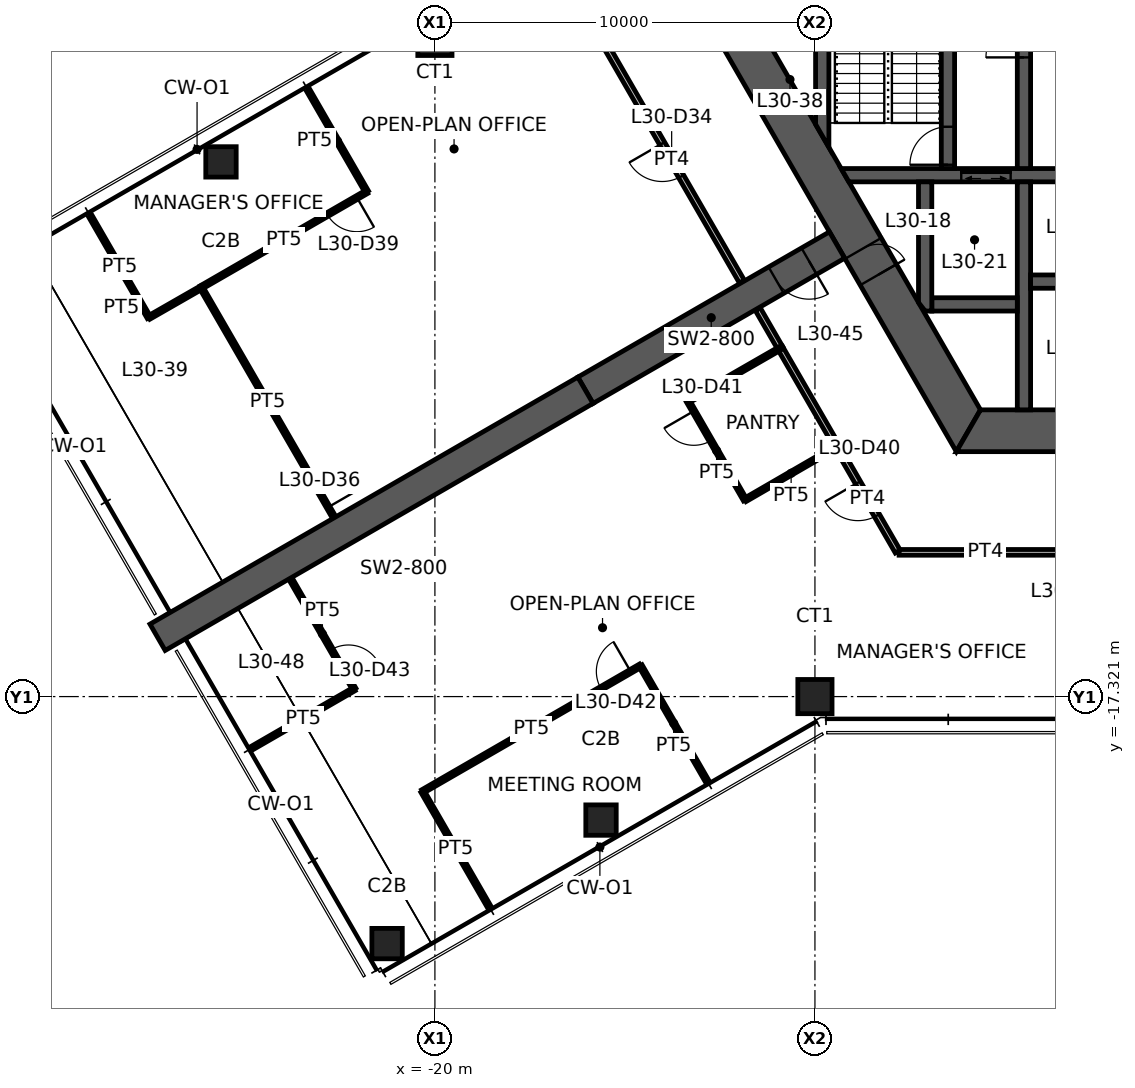
"""IFC4 building model, lengths in metres.
Left out: names, types, materials, properties, quantities, classifications, styles, units other than length and angle.
Written with IfcOpenShell. Run it as: python <this file> out.ifc"""

import sys

from ifc_helpers import new_model, si_unit, direction, frame, frame_2d, origin, origin_2d, place, context, subcontext, project, spatial, polyline, rectangle, hollow_rectangle, outline, extrude, element, fill, save


model = new_model("IFC4")
c1 = context("Model", 3, precision=1e-05, world=origin(), true_north=direction((0.0, 1.0)))
c2 = subcontext(c1, "Body", "Model", "MODEL_VIEW")
j1 = project(units=[si_unit("LENGTHUNIT", "METRE"), si_unit("PLANEANGLEUNIT", "RADIAN")], contexts=[c1])
p1 = place(None, origin())
s1 = spatial("IfcSite", under=j1, at=p1, CompositionType="ELEMENT")
p2 = place(p1, origin())
s2 = spatial("IfcBuilding", under=s1, at=p2, CompositionType="ELEMENT")
p3 = place(p2, frame((0.0, 0.0, 119.7)))
s3 = spatial("IfcBuildingStorey", under=s2, at=p3, CompositionType="ELEMENT", Elevation=119.7)
for number, where, z_axis, x_axis in (
    (1, (-20.0, 0.0, 0.0), (0.0, 0.0, 1.0), (1.0, 0.0, 0.0)),
    (2, (-10.0, -17.321, 0.0), (0.0, 0.0, 1.0), (1.0, 0.0, 0.0)),
):
    element("IfcColumn", number, at=place(p3, frame(where, z_axis=z_axis, x_axis=x_axis)), inside=s3, PredefinedType="COLUMN", context=c2, shape_type="SweptSolid", body=[
        extrude(hollow_rectangle(XDim=0.9, YDim=0.9, WallThickness=0.07, at=origin_2d()), origin(), (0.0, 0.0, 1.0), 3.9),
    ])
for number, where, z_axis, x_axis in (
    (3, (-25.629, -3.25, 0.0), (0.0, 0.0, 1.0), (1.0, 0.0, 0.0)),
    (4, (-15.629, -20.571, 0.0), (0.0, 0.0, 1.0), (1.0, 0.0, 0.0)),
    (5, (-21.258, -23.821, 0.0), (0.0, 0.0, 1.0), (1.0, 0.0, 0.0)),
):
    element("IfcColumn", number, at=place(p3, frame(where, z_axis=z_axis, x_axis=x_axis)), inside=s3, PredefinedType="COLUMN", context=c2, shape_type="SweptSolid", body=[
        extrude(hollow_rectangle(XDim=0.8, YDim=0.8, WallThickness=0.045, at=origin_2d()), origin(), (0.0, 0.0, 1.0), 3.9),
    ])
p4 = place(p3, frame((-11.922, 0.0, 0.0), z_axis=(0.0, 0.0, 1.0), x_axis=(0.500004296715, -0.866022923061, 0.0)))
e6 = element("IfcWall", 6, at=p4, inside=s3, PredefinedType="SHEAR", context=c2, shape_type="SweptSolid", body=[
    extrude(outline(polyline([(-0.318, -0.55), (6.381, -0.55), (7.181, -0.55), (12.24, -0.55), (11.605, 0.55), (7.181, 0.55), (6.381, 0.55), (0.318, 0.55), (-0.318, -0.55)])), origin(), (0.0, 0.0, 1.0), 3.9),
])
p5 = place(p4, frame((6.381, 0.0, 0.0)))
e7 = element("IfcOpeningElement", 7, at=p5, cuts=e6, PredefinedType="OPENING", context=c2, shape_type="SweptSolid", body=[
    extrude(rectangle(XDim=0.8, YDim=2.1, at=frame_2d((0.4, 1.05))), frame((0.0, 0.56, 0.0), z_axis=(0.0, -1.0, 0.0), x_axis=(1.0, 0.0, 0.0)), (0.0, 0.0, 1.0), 1.12),
])
p6 = place(p3, frame((-5.961, -10.325, 0.0), z_axis=(0.0, 0.0, 1.0), x_axis=(1.0, 0.0, 0.0)))
e8 = element("IfcWall", 8, at=p6, inside=s3, PredefinedType="SHEAR", context=c2, shape_type="SweptSolid", body=[
    extrude(outline(polyline([(-0.318, -0.55), (5.461, -0.55), (6.461, -0.55), (12.24, -0.55), (11.605, 0.55), (6.461, 0.55), (5.461, 0.55), (0.318, 0.55), (-0.318, -0.55)])), origin(), (0.0, 0.0, 1.0), 3.9),
])
p7 = place(p6, frame((5.461, 0.0, 0.0)))
e9 = element("IfcOpeningElement", 9, at=p7, cuts=e8, PredefinedType="OPENING", context=c2, shape_type="SweptSolid", body=[
    extrude(rectangle(XDim=1.0, YDim=2.1, at=frame_2d((0.5, 1.05))), frame((0.0, 0.56, 0.0), z_axis=(0.0, -1.0, 0.0), x_axis=(1.0, 0.0, 0.0)), (0.0, 0.0, 1.0), 1.12),
])
p8 = place(p3, frame((-9.418, -5.438, 0.0), z_axis=(0.0, 0.0, 1.0), x_axis=(-0.866029782078, -0.499992416496, 0.0)))
e10 = element("IfcWall", 10, at=p8, inside=s3, PredefinedType="SHEAR", context=c2, shape_type="SweptSolid", body=[
    extrude(rectangle(XDim=7.646, YDim=0.8, at=frame_2d((3.823, 0.0))), origin(), (0.0, 0.0, 1.0), 3.9),
])
p9 = place(p8, frame((0.85, 0.0, 0.0)))
e11 = element("IfcOpeningElement", 11, at=p9, cuts=e10, PredefinedType="OPENING", context=c2, shape_type="SweptSolid", body=[
    extrude(rectangle(XDim=1.0, YDim=2.1, at=frame_2d((0.5, 1.05))), frame((0.0, 0.41, 0.0), z_axis=(0.0, -1.0, 0.0), x_axis=(1.0, 0.0, 0.0)), (0.0, 0.0, 1.0), 0.82),
])
p10 = place(p3, frame((-16.039, -9.26, 0.0), z_axis=(0.0, 0.0, 1.0), x_axis=(-0.866024837091, -0.50000098154, 0.0)))
e12 = element("IfcWall", 12, at=p10, inside=s3, PredefinedType="SHEAR", context=c2, shape_type="SweptSolid", body=[
    extrude(rectangle(XDim=13.0, YDim=0.8, at=frame_2d((6.5, 0.0))), origin(), (0.0, 0.0, 1.0), 3.9),
])
p11 = place(p3, frame((-9.209, -3.6, 0.0), z_axis=(0.0, 0.0, 1.0), x_axis=(1.0, 0.0, 0.0)))
e13 = element("IfcWall", 13, at=p11, inside=s3, PredefinedType="SHEAR", context=c2, shape_type="SweptSolid", body=[
    extrude(outline(polyline([(0.101, -0.175), (3.059, -0.175), (4.359, -0.175), (5.609, -0.175), (6.709, -0.175), (7.784, -0.175), (7.784, 0.175), (6.709, 0.175), (5.609, 0.175), (4.359, 0.175), (3.059, 0.175), (-0.101, 0.175), (0.101, -0.175)])), origin(), (0.0, 0.0, 1.0), 3.9),
])
p12 = place(p11, frame((5.609, 0.0, 0.0)))
e14 = element("IfcOpeningElement", 14, at=p12, cuts=e13, PredefinedType="OPENING", context=c2, shape_type="SweptSolid", body=[
    extrude(rectangle(XDim=1.1, YDim=2.1, at=frame_2d((0.55, 1.05))), frame((0.0, 0.185, 0.0), z_axis=(0.0, -1.0, 0.0), x_axis=(1.0, 0.0, 0.0)), (0.0, 0.0, 1.0), 0.37),
])
p13 = place(p11, frame((3.059, 0.0, 0.0)))
e15 = element("IfcOpeningElement", 15, at=p13, cuts=e13, PredefinedType="OPENING", context=c2, shape_type="SweptSolid", body=[
    extrude(rectangle(XDim=1.3, YDim=2.1, at=frame_2d((0.65, 1.05))), frame((0.0, 0.185, 0.0), z_axis=(0.0, -1.0, 0.0), x_axis=(1.0, 0.0, 0.0)), (0.0, 0.0, 1.0), 0.37),
])
p14 = place(p3, frame((-4.5, -3.425, 0.0), z_axis=(0.0, 0.0, 1.0), x_axis=(0.0, 1.0, 0.0)))
e16 = element("IfcWall", 16, at=p14, inside=s3, PredefinedType="SHEAR", context=c2, shape_type="SweptSolid", body=[
    extrude(rectangle(XDim=6.85, YDim=0.35, at=frame_2d((3.425, 0.0))), origin(), (0.0, 0.0, 1.0), 3.9),
])
p15 = place(p14, frame((2.925, 0.0, 0.0)))
e17 = element("IfcOpeningElement", 17, at=p15, cuts=e16, PredefinedType="OPENING", context=c2, shape_type="SweptSolid", body=[
    extrude(rectangle(XDim=1.0, YDim=2.1, at=frame_2d((0.5, 1.05))), frame((0.0, 0.185, 0.0), z_axis=(0.0, -1.0, 0.0), x_axis=(1.0, 0.0, 0.0)), (0.0, 0.0, 1.0), 0.37),
])
p16 = place(p3, frame((-6.5, -3.425, 0.0), z_axis=(0.0, 0.0, 1.0), x_axis=(0.0, 1.0, 0.0)))
e18 = element("IfcWall", 18, at=p16, inside=s3, PredefinedType="SHEAR", context=c2, shape_type="SweptSolid", body=[
    extrude(rectangle(XDim=6.85, YDim=0.35, at=frame_2d((3.425, 0.0))), origin(), (0.0, 0.0, 1.0), 3.9),
])
p17 = place(p16, frame((0.1, 0.0, 0.0)))
e19 = element("IfcOpeningElement", 19, at=p17, cuts=e18, PredefinedType="OPENING", context=c2, shape_type="SweptSolid", body=[
    extrude(rectangle(XDim=1.0, YDim=2.1, at=frame_2d((0.5, 1.05))), frame((0.0, 0.185, 0.0), z_axis=(0.0, -1.0, 0.0), x_axis=(1.0, 0.0, 0.0)), (0.0, 0.0, 1.0), 0.37),
])
p18 = place(p3, frame((-4.5, -3.775, 0.0), z_axis=(0.0, 0.0, 1.0), x_axis=(0.0, -1.0, 0.0)))
e20 = element("IfcWall", 20, at=p18, inside=s3, PredefinedType="SHEAR", context=c2, shape_type="SweptSolid", body=[
    extrude(rectangle(XDim=6.0, YDim=0.35, at=frame_2d((3.0, 0.0))), origin(), (0.0, 0.0, 1.0), 3.9),
])
p19 = place(p3, frame((-4.325, -6.4, 0.0), z_axis=(0.0, 0.0, 1.0), x_axis=(1.0, 0.0, 0.0)))
e21 = element("IfcWall", 21, at=p19, inside=s3, PredefinedType="SHEAR", context=c2, shape_type="SweptSolid", body=[
    extrude(rectangle(XDim=2.55, YDim=0.35, at=frame_2d((1.275, 0.0))), origin(), (0.0, 0.0, 1.0), 3.9),
])
p20 = place(p3, frame((-6.925, -7.0, 0.0), z_axis=(0.0, 0.0, 1.0), x_axis=(1.0, 0.0, 0.0)))
e22 = element("IfcWall", 22, at=p20, inside=s3, PredefinedType="SHEAR", context=c2, shape_type="SweptSolid", body=[
    extrude(rectangle(XDim=2.25, YDim=0.35, at=frame_2d((1.125, 0.0))), origin(), (0.0, 0.0, 1.0), 3.9),
])
p21 = place(p3, frame((-7.1, -3.775, 0.0), z_axis=(0.0, 0.0, 1.0), x_axis=(0.0, -1.0, 0.0)))
e23 = element("IfcWall", 23, at=p21, inside=s3, PredefinedType="SHEAR", context=c2, shape_type="SweptSolid", body=[
    extrude(outline(polyline([(0.0, -0.175), (3.175, -0.175), (3.4, 0.0), (3.4, 0.175), (0.0, 0.175), (0.0, -0.175)])), origin(), (0.0, 0.0, 1.0), 3.9),
])
p22 = place(p3, frame((-9.808, -2.562, 0.0), z_axis=(0.0, 0.0, 1.0), x_axis=(0.0, 1.0, 0.0)))
e24 = element("IfcWall", 24, at=p22, inside=s3, PredefinedType="SHEAR", context=c2, shape_type="SweptSolid", body=[
    extrude(outline(polyline([(-0.303, -0.175), (5.428, -0.175), (4.821, 0.175), (0.303, 0.175), (-0.303, -0.175)])), origin(), (0.0, 0.0, 1.0), 3.9),
])
p23 = place(p3, frame((-11.923, -6.399, 0.0), z_axis=(0.0, 0.0, 1.0), x_axis=(-0.499980837837, 0.866036466782, 0.0)))
e25 = element("IfcWall", 25, at=p23, inside=s3, PredefinedType="PARTITIONING", context=c2, shape_type="SweptSolid", body=[
    extrude(rectangle(XDim=7.388, YDim=0.15, at=frame_2d((3.694, 0.0))), origin(), (0.0, 0.0, 1.0), 2.35),
])
p24 = place(p23, frame((3.194, 0.0, 0.0)))
e26 = element("IfcOpeningElement", 26, at=p24, cuts=e25, PredefinedType="OPENING", context=c2, shape_type="SweptSolid", body=[
    extrude(rectangle(XDim=1.0, YDim=2.1, at=frame_2d((0.5, 1.05))), frame((0.0, 0.085, 0.0), z_axis=(0.0, -1.0, 0.0), x_axis=(1.0, 0.0, 0.0)), (0.0, 0.0, 1.0), 0.17),
])
p25 = place(p3, frame((-29.065, -4.68, 0.0), z_axis=(0.0, 0.0, 1.0), x_axis=(0.500120427123, -0.865955863987, 0.0)))
e27 = element("IfcWall", 27, at=p25, inside=s3, PredefinedType="PARTITIONING", context=c2, shape_type="SweptSolid", body=[
    extrude(rectangle(XDim=3.08, YDim=0.1, at=frame_2d((1.54, 0.0))), origin(), (0.0, 0.0, 1.0), 2.35),
])
p26 = place(p3, frame((-27.525, -7.347, 0.0), z_axis=(0.0, 0.0, 1.0), x_axis=(0.867571917523, 0.497311741191, 0.0)))
e28 = element("IfcWall", 28, at=p26, inside=s3, PredefinedType="PARTITIONING", context=c2, shape_type="SweptSolid", body=[
    extrude(rectangle(XDim=1.591, YDim=0.1, at=frame_2d((0.795, 0.0))), origin(), (0.0, 0.0, 1.0), 2.35),
])
p27 = place(p3, frame((-26.151, -6.554, 0.0), z_axis=(0.0, 0.0, 1.0), x_axis=(0.500528756763, -0.865719910625, 0.0)))
e29 = element("IfcWall", 29, at=p27, inside=s3, PredefinedType="PARTITIONING", context=c2, shape_type="SweptSolid", body=[
    extrude(rectangle(XDim=6.979, YDim=0.1, at=frame_2d((3.49, 0.0))), origin(), (0.0, 0.0, 1.0), 2.35),
])
p28 = place(p27, frame((5.78, 0.0, 0.0)))
e30 = element("IfcOpeningElement", 30, at=p28, cuts=e29, PredefinedType="OPENING", context=c2, shape_type="SweptSolid", body=[
    extrude(rectangle(XDim=0.9, YDim=2.1, at=frame_2d((0.45, 1.05))), frame((0.0, 0.06, 0.0), z_axis=(0.0, -1.0, 0.0), x_axis=(1.0, 0.0, 0.0)), (0.0, 0.0, 1.0), 0.12),
])
p29 = place(p3, frame((-23.332, -1.37, 0.0), z_axis=(0.0, 0.0, 1.0), x_axis=(0.499992328818, -0.866029832698, 0.0)))
e31 = element("IfcWall", 31, at=p29, inside=s3, PredefinedType="PARTITIONING", context=c2, shape_type="SweptSolid", body=[
    extrude(rectangle(XDim=3.08, YDim=0.1, at=frame_2d((1.54, 0.0))), origin(), (0.0, 0.0, 1.0), 2.35),
])
p30 = place(p3, frame((-21.792, -4.037, 0.0), z_axis=(0.0, 0.0, 1.0), x_axis=(-0.866037775365, -0.499978571182, 0.0)))
e32 = element("IfcWall", 32, at=p30, inside=s3, PredefinedType="PARTITIONING", context=c2, shape_type="SweptSolid", body=[
    extrude(rectangle(XDim=5.033, YDim=0.1, at=frame_2d((2.517, 0.0))), origin(), (0.0, 0.0, 1.0), 2.35),
])
p31 = place(p30, frame((0.3, 0.0, 0.0)))
e33 = element("IfcOpeningElement", 33, at=p31, cuts=e32, PredefinedType="OPENING", context=c2, shape_type="SweptSolid", body=[
    extrude(rectangle(XDim=0.9, YDim=2.1, at=frame_2d((0.45, 1.05))), frame((0.0, 0.06, 0.0), z_axis=(0.0, -1.0, 0.0), x_axis=(1.0, 0.0, 0.0)), (0.0, 0.0, 1.0), 0.12),
])
p32 = place(p3, frame((-9.41, -10.75, 0.0), z_axis=(0.0, 0.0, 1.0), x_axis=(-0.500038395149, 0.8660032352, 0.0)))
e34 = element("IfcWall", 34, at=p32, inside=s3, PredefinedType="PARTITIONING", context=c2, shape_type="SweptSolid", body=[
    extrude(rectangle(XDim=3.01, YDim=0.15, at=frame_2d((1.505, 0.0))), origin(), (0.0, 0.0, 1.0), 2.35),
])
p33 = place(p3, frame((-10.911, -8.152, 0.0), z_axis=(0.0, 0.0, 1.0), x_axis=(-0.499841408252, 0.866116947413, 0.0)))
e35 = element("IfcWall", 35, at=p33, inside=s3, PredefinedType="PARTITIONING", context=c2, shape_type="SweptSolid", body=[
    extrude(rectangle(XDim=1.185, YDim=0.15, at=frame_2d((0.592, 0.0))), origin(), (0.0, 0.0, 1.0), 2.35),
])
p34 = place(p3, frame((-7.82, -13.505, 0.0), z_axis=(0.0, 0.0, 1.0), x_axis=(-0.499983030129, 0.866035201123, 0.0)))
e36 = element("IfcWall", 36, at=p34, inside=s3, PredefinedType="PARTITIONING", context=c2, shape_type="SweptSolid", body=[
    extrude(rectangle(XDim=3.19, YDim=0.15, at=frame_2d((1.595, 0.0))), origin(), (0.0, 0.0, 1.0), 2.35),
])
p35 = place(p34, frame((1.095, 0.0, 0.0)))
e37 = element("IfcOpeningElement", 37, at=p35, cuts=e36, PredefinedType="OPENING", context=c2, shape_type="SweptSolid", body=[
    extrude(rectangle(XDim=1.0, YDim=2.1, at=frame_2d((0.5, 1.05))), frame((0.0, 0.085, 0.0), z_axis=(0.0, -1.0, 0.0), x_axis=(1.0, 0.0, 0.0)), (0.0, 0.0, 1.0), 0.17),
])
p36 = place(p3, frame((-13.338, -9.548, 0.0), z_axis=(0.0, 0.0, 1.0), x_axis=(0.866833758708, 0.498597267105, 0.0)))
e38 = element("IfcWall", 38, at=p36, inside=s3, PredefinedType="PARTITIONING", context=c2, shape_type="SweptSolid", body=[
    extrude(rectangle(XDim=2.8, YDim=0.1, at=frame_2d((1.4, 0.0))), origin(), (0.0, 0.0, 1.0), 2.35),
])
p37 = place(p3, frame((-11.838, -12.146, 0.0), z_axis=(0.0, 0.0, 1.0), x_axis=(-0.499990139034, 0.866031096941, 0.0)))
e39 = element("IfcWall", 39, at=p37, inside=s3, PredefinedType="PARTITIONING", context=c2, shape_type="SweptSolid", body=[
    extrude(rectangle(XDim=3.0, YDim=0.1, at=frame_2d((1.5, 0.0))), origin(), (0.0, 0.0, 1.0), 2.35),
])
p38 = place(p37, frame((1.8, 0.0, 0.0)))
e40 = element("IfcOpeningElement", 40, at=p38, cuts=e39, PredefinedType="OPENING", context=c2, shape_type="SweptSolid", body=[
    extrude(rectangle(XDim=0.9, YDim=2.1, at=frame_2d((0.45, 1.05))), frame((0.0, 0.06, 0.0), z_axis=(0.0, -1.0, 0.0), x_axis=(1.0, 0.0, 0.0)), (0.0, 0.0, 1.0), 0.12),
])
p39 = place(p3, frame((-9.415, -10.742, 0.0), z_axis=(0.0, 0.0, 1.0), x_axis=(-0.865195372903, -0.501434907746, 0.0)))
e41 = element("IfcWall", 41, at=p39, inside=s3, PredefinedType="PARTITIONING", context=c2, shape_type="SweptSolid", body=[
    extrude(rectangle(XDim=2.8, YDim=0.1, at=frame_2d((1.4, 0.0))), origin(), (0.0, 0.0, 1.0), 2.35),
])
p40 = place(p3, frame((-20.325, -19.817, 0.0), z_axis=(0.0, 0.0, 1.0), x_axis=(0.866037567856, 0.499978930619, 0.0)))
e42 = element("IfcWall", 42, at=p40, inside=s3, PredefinedType="PARTITIONING", context=c2, shape_type="SweptSolid", body=[
    extrude(rectangle(XDim=6.619, YDim=0.1, at=frame_2d((3.31, 0.0))), origin(), (0.0, 0.0, 1.0), 2.35),
])
p41 = place(p40, frame((5.42, 0.0, 0.0)))
e43 = element("IfcOpeningElement", 43, at=p41, cuts=e42, PredefinedType="OPENING", context=c2, shape_type="SweptSolid", body=[
    extrude(rectangle(XDim=0.9, YDim=2.1, at=frame_2d((0.45, 1.05))), frame((0.0, 0.06, 0.0), z_axis=(0.0, -1.0, 0.0), x_axis=(1.0, 0.0, 0.0)), (0.0, 0.0, 1.0), 0.12),
])
p42 = place(p3, frame((-18.585, -22.831, 0.0), z_axis=(0.0, 0.0, 1.0), x_axis=(-0.499979528911, 0.866037222451, 0.0)))
e44 = element("IfcWall", 44, at=p42, inside=s3, PredefinedType="PARTITIONING", context=c2, shape_type="SweptSolid", body=[
    extrude(rectangle(XDim=3.48, YDim=0.1, at=frame_2d((1.74, 0.0))), origin(), (0.0, 0.0, 1.0), 2.35),
])
p43 = place(p3, frame((-14.592, -16.508, 0.0), z_axis=(0.0, 0.0, 1.0), x_axis=(0.500010275428, -0.866019471182, 0.0)))
e45 = element("IfcWall", 45, at=p43, inside=s3, PredefinedType="PARTITIONING", context=c2, shape_type="SweptSolid", body=[
    extrude(rectangle(XDim=3.5, YDim=0.1, at=frame_2d((1.75, 0.0))), origin(), (0.0, 0.0, 1.0), 2.35),
])
p44 = place(p3, frame((-23.797, -14.224, 0.0), z_axis=(0.0, 0.0, 1.0), x_axis=(0.500015043844, -0.866016718043, 0.0)))
e46 = element("IfcWall", 46, at=p44, inside=s3, PredefinedType="PARTITIONING", context=c2, shape_type="SweptSolid", body=[
    extrude(rectangle(XDim=3.347, YDim=0.1, at=frame_2d((1.673, 0.0))), origin(), (0.0, 0.0, 1.0), 2.35),
])
p45 = place(p44, frame((2.147, 0.0, 0.0)))
e47 = element("IfcOpeningElement", 47, at=p45, cuts=e46, PredefinedType="OPENING", context=c2, shape_type="SweptSolid", body=[
    extrude(rectangle(XDim=0.9, YDim=2.1, at=frame_2d((0.45, 1.05))), frame((0.0, 0.06, 0.0), z_axis=(0.0, -1.0, 0.0), x_axis=(1.0, 0.0, 0.0)), (0.0, 0.0, 1.0), 0.12),
])
p46 = place(p3, frame((-22.123, -17.122, 0.0), z_axis=(0.0, 0.0, 1.0), x_axis=(-0.86602952684, -0.49999285859, 0.0)))
e48 = element("IfcWall", 48, at=p46, inside=s3, PredefinedType="PARTITIONING", context=c2, shape_type="SweptSolid", body=[
    extrude(rectangle(XDim=3.1, YDim=0.1, at=frame_2d((1.55, 0.0))), origin(), (0.0, 0.0, 1.0), 2.35),
])
p47 = place(p3, frame((-3.241, -13.525, 0.0), z_axis=(0.0, 0.0, 1.0), x_axis=(-1.0, 0.0, 0.0)))
e49 = element("IfcWall", 49, at=p47, inside=s3, PredefinedType="PARTITIONING", context=c2, shape_type="SweptSolid", body=[
    extrude(rectangle(XDim=4.544, YDim=0.15, at=frame_2d((2.272, 0.0))), origin(), (0.0, 0.0, 1.0), 2.35),
])
p48 = place(p5, origin())
e50 = element("IfcDoor", 50, at=p48, inside=s3, OperationType="SINGLE_SWING_RIGHT", PredefinedType="DOOR", context=c2, shape_type="SweptSolid", body=[
    extrude(rectangle(XDim=0.8, YDim=2.1, at=frame_2d((0.4, 1.05))), frame((0.0, 0.025, 0.0), z_axis=(0.0, -1.0, 0.0), x_axis=(1.0, 0.0, 0.0)), (0.0, 0.0, 1.0), 0.05),
])
fill(e7, e50)
p49 = place(p15, origin())
e51 = element("IfcDoor", 51, at=p49, inside=s3, OperationType="SINGLE_SWING_LEFT", PredefinedType="DOOR", context=c2, shape_type="SweptSolid", body=[
    extrude(rectangle(XDim=1.0, YDim=2.1, at=frame_2d((0.5, 1.05))), frame((0.0, 0.025, 0.0), z_axis=(0.0, -1.0, 0.0), x_axis=(1.0, 0.0, 0.0)), (0.0, 0.0, 1.0), 0.05),
])
fill(e17, e51)
p50 = place(p17, origin())
e52 = element("IfcDoor", 52, at=p50, inside=s3, OperationType="SINGLE_SWING_LEFT", PredefinedType="DOOR", context=c2, shape_type="SweptSolid", body=[
    extrude(rectangle(XDim=1.0, YDim=2.1, at=frame_2d((0.5, 1.05))), frame((0.0, 0.025, 0.0), z_axis=(0.0, -1.0, 0.0), x_axis=(1.0, 0.0, 0.0)), (0.0, 0.0, 1.0), 0.05),
])
fill(e19, e52)
p51 = place(p9, origin())
e53 = element("IfcDoor", 53, at=p51, inside=s3, OperationType="SINGLE_SWING_LEFT", PredefinedType="DOOR", context=c2, shape_type="SweptSolid", body=[
    extrude(rectangle(XDim=1.0, YDim=2.1, at=frame_2d((0.5, 1.05))), frame((0.0, 0.025, 0.0), z_axis=(0.0, -1.0, 0.0), x_axis=(1.0, 0.0, 0.0)), (0.0, 0.0, 1.0), 0.05),
])
fill(e11, e53)
p52 = place(p24, origin())
e54 = element("IfcDoor", 54, at=p52, inside=s3, OperationType="SINGLE_SWING_RIGHT", PredefinedType="DOOR", context=c2, shape_type="SweptSolid", body=[
    extrude(rectangle(XDim=1.0, YDim=2.1, at=frame_2d((0.5, 1.05))), frame((0.0, 0.025, 0.0), z_axis=(0.0, -1.0, 0.0), x_axis=(1.0, 0.0, 0.0)), (0.0, 0.0, 1.0), 0.05),
])
fill(e26, e54)
p53 = place(p28, origin())
e55 = element("IfcDoor", 55, at=p53, inside=s3, OperationType="SINGLE_SWING_RIGHT", PredefinedType="DOOR", context=c2, shape_type="SweptSolid", body=[
    extrude(rectangle(XDim=0.9, YDim=2.1, at=frame_2d((0.45, 1.05))), frame((0.0, 0.025, 0.0), z_axis=(0.0, -1.0, 0.0), x_axis=(1.0, 0.0, 0.0)), (0.0, 0.0, 1.0), 0.05),
])
fill(e30, e55)
p54 = place(p31, origin())
e56 = element("IfcDoor", 56, at=p54, inside=s3, OperationType="SINGLE_SWING_LEFT", PredefinedType="DOOR", context=c2, shape_type="SweptSolid", body=[
    extrude(rectangle(XDim=0.9, YDim=2.1, at=frame_2d((0.45, 1.05))), frame((0.0, 0.025, 0.0), z_axis=(0.0, -1.0, 0.0), x_axis=(1.0, 0.0, 0.0)), (0.0, 0.0, 1.0), 0.05),
])
fill(e33, e56)
p55 = place(p35, origin())
e57 = element("IfcDoor", 57, at=p55, inside=s3, OperationType="SINGLE_SWING_RIGHT", PredefinedType="DOOR", context=c2, shape_type="SweptSolid", body=[
    extrude(rectangle(XDim=1.0, YDim=2.1, at=frame_2d((0.5, 1.05))), frame((0.0, 0.025, 0.0), z_axis=(0.0, -1.0, 0.0), x_axis=(1.0, 0.0, 0.0)), (0.0, 0.0, 1.0), 0.05),
])
fill(e37, e57)
p56 = place(p38, origin())
e58 = element("IfcDoor", 58, at=p56, inside=s3, OperationType="SINGLE_SWING_RIGHT", PredefinedType="DOOR", context=c2, shape_type="SweptSolid", body=[
    extrude(rectangle(XDim=0.9, YDim=2.1, at=frame_2d((0.45, 1.05))), frame((0.0, 0.025, 0.0), z_axis=(0.0, -1.0, 0.0), x_axis=(1.0, 0.0, 0.0)), (0.0, 0.0, 1.0), 0.05),
])
fill(e40, e58)
p57 = place(p41, origin())
e59 = element("IfcDoor", 59, at=p57, inside=s3, OperationType="SINGLE_SWING_RIGHT", PredefinedType="DOOR", context=c2, shape_type="SweptSolid", body=[
    extrude(rectangle(XDim=0.9, YDim=2.1, at=frame_2d((0.45, 1.05))), frame((0.0, 0.025, 0.0), z_axis=(0.0, -1.0, 0.0), x_axis=(1.0, 0.0, 0.0)), (0.0, 0.0, 1.0), 0.05),
])
fill(e43, e59)
p58 = place(p45, origin())
e60 = element("IfcDoor", 60, at=p58, inside=s3, OperationType="SINGLE_SWING_RIGHT", PredefinedType="DOOR", context=c2, shape_type="SweptSolid", body=[
    extrude(rectangle(XDim=0.9, YDim=2.1, at=frame_2d((0.45, 1.05))), frame((0.0, 0.025, 0.0), z_axis=(0.0, -1.0, 0.0), x_axis=(1.0, 0.0, 0.0)), (0.0, 0.0, 1.0), 0.05),
])
fill(e47, e60)
p59 = place(p13, origin())
e61 = element("IfcDoor", 61, at=p59, inside=s3, OperationType="DOUBLE_DOOR_SLIDING", PredefinedType="DOOR", context=c2, shape_type="SweptSolid", body=[
    extrude(rectangle(XDim=1.3, YDim=2.1, at=frame_2d((0.65, 1.05))), frame((0.0, 0.025, 0.0), z_axis=(0.0, -1.0, 0.0), x_axis=(1.0, 0.0, 0.0)), (0.0, 0.0, 1.0), 0.05),
])
fill(e15, e61)
save(model, sys.argv[1])
